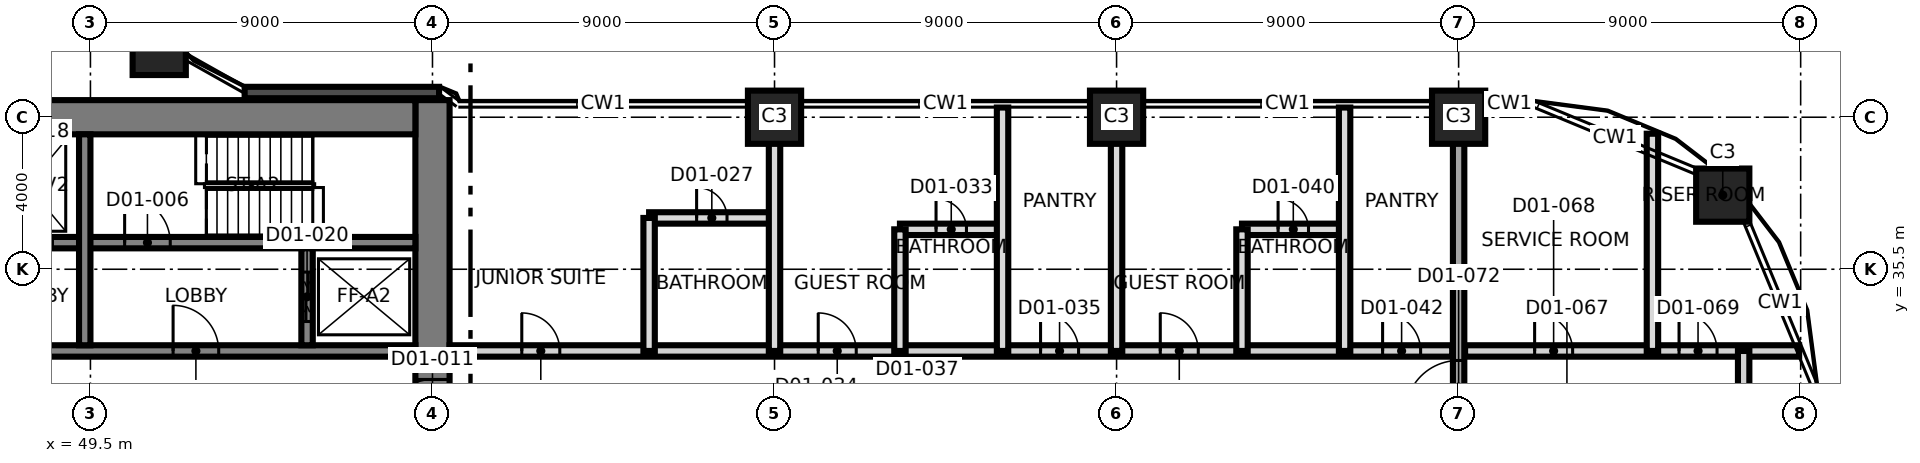
"""IFC4 building model, lengths in metres.
Left out: names, types, materials, properties, quantities, classifications, styles, units other than length and angle.
Written with IfcOpenShell. Run it as: python <this file> out.ifc"""

import sys

from ifc_helpers import new_model, si_unit, direction, frame, frame_2d, origin, origin_2d, place, context, subcontext, project, spatial, rectangle, extrude, element, fill, save


model = new_model("IFC4")
c1 = context("Model", 3, precision=1e-05, world=origin(), true_north=direction((0.0, 1.0)))
c2 = subcontext(c1, "Body", "Model", "MODEL_VIEW")
j1 = project(units=[si_unit("LENGTHUNIT", "METRE"), si_unit("PLANEANGLEUNIT", "RADIAN")], contexts=[c1])
p1 = place(None, origin())
s1 = spatial("IfcSite", under=j1, at=p1, CompositionType="ELEMENT")
p2 = place(p1, origin())
s2 = spatial("IfcBuilding", under=s1, at=p2, CompositionType="ELEMENT")
p3 = place(p2, frame((0.0, 0.0, 33.5)))
s3 = spatial("IfcBuildingStorey", under=s2, at=p3, CompositionType="ELEMENT", Elevation=33.5)
p4 = place(p3, frame((58.5, 21.05, 0.0), z_axis=(0.0, 0.0, 1.0), x_axis=(0.0, 1.0, 0.0)))
e1 = element("IfcWall", 1, at=p4, inside=s3, PredefinedType="SHEAR", context=c2, shape_type="SweptSolid", body=[
    extrude(rectangle(XDim=18.9, YDim=0.9, at=frame_2d((9.45, 0.0))), origin(), (0.0, 0.0, 1.0), 3.7),
])
p5 = place(p4, frame((10.35, 0.0, 0.0)))
e2 = element("IfcOpeningElement", 2, at=p5, cuts=e1, PredefinedType="OPENING", context=c2, shape_type="SweptSolid", body=[
    extrude(rectangle(XDim=1.2, YDim=2.1, at=frame_2d((0.6, 1.05))), frame((0.0, 0.46, 0.0), z_axis=(0.0, -1.0, 0.0), x_axis=(1.0, 0.0, 0.0)), (0.0, 0.0, 1.0), 0.92),
])
p6 = place(p3, frame((31.05, 39.5, 0.0), z_axis=(0.0, 0.0, 1.0), x_axis=(1.0, 0.0, 0.0)))
e3 = element("IfcWall", 3, at=p6, inside=s3, PredefinedType="SHEAR", context=c2, shape_type="SweptSolid", body=[
    extrude(rectangle(XDim=27.0, YDim=0.9, at=frame_2d((13.5, 0.0))), origin(), (0.0, 0.0, 1.0), 3.7),
])
p7 = place(p6, frame((10.65, 0.0, 0.0)))
e4 = element("IfcOpeningElement", 4, at=p7, cuts=e3, PredefinedType="OPENING", context=c2, shape_type="SweptSolid", body=[
    extrude(rectangle(XDim=1.2, YDim=2.1, at=frame_2d((0.6, 1.05))), frame((0.0, 0.46, 0.0), z_axis=(0.0, -1.0, 0.0), x_axis=(1.0, 0.0, 0.0)), (0.0, 0.0, 1.0), 0.92),
])
p8 = place(p3, frame((31.95, 33.35, 0.0), z_axis=(0.0, 0.0, 1.0), x_axis=(1.0, 0.0, 0.0)))
e5 = element("IfcWall", 5, at=p8, inside=s3, PredefinedType="SHEAR", context=c2, shape_type="SweptSolid", body=[
    extrude(rectangle(XDim=26.1, YDim=0.3, at=frame_2d((13.05, 0.0))), origin(), (0.0, 0.0, 1.0), 3.7),
])
p9 = place(p8, frame((13.7, 0.0, 0.0)))
e6 = element("IfcOpeningElement", 6, at=p9, cuts=e5, PredefinedType="OPENING", context=c2, shape_type="SweptSolid", body=[
    extrude(rectangle(XDim=1.4, YDim=2.1, at=frame_2d((0.7, 1.05))), frame((0.0, 0.16, 0.0), z_axis=(0.0, -1.0, 0.0), x_axis=(1.0, 0.0, 0.0)), (0.0, 0.0, 1.0), 0.32),
])
p10 = place(p8, frame((5.175, 0.0, 0.0)))
e7 = element("IfcOpeningElement", 7, at=p10, cuts=e5, PredefinedType="OPENING", context=c2, shape_type="SweptSolid", body=[
    extrude(rectangle(XDim=1.2, YDim=2.1, at=frame_2d((0.6, 1.05))), frame((0.0, 0.16, 0.0), z_axis=(0.0, -1.0, 0.0), x_axis=(1.0, 0.0, 0.0)), (0.0, 0.0, 1.0), 0.32),
])
p11 = place(p8, frame((19.725, 0.0, 0.0)))
e8 = element("IfcOpeningElement", 8, at=p11, cuts=e5, PredefinedType="OPENING", context=c2, shape_type="SweptSolid", body=[
    extrude(rectangle(XDim=1.2, YDim=2.1, at=frame_2d((0.6, 1.05))), frame((0.0, 0.16, 0.0), z_axis=(0.0, -1.0, 0.0), x_axis=(1.0, 0.0, 0.0)), (0.0, 0.0, 1.0), 0.32),
])
p12 = place(p3, frame((43.5, 36.2, 0.0), z_axis=(0.0, 0.0, 1.0), x_axis=(1.0, 0.0, 0.0)))
e9 = element("IfcWall", 9, at=p12, inside=s3, PredefinedType="SHEAR", context=c2, shape_type="SweptSolid", body=[
    extrude(rectangle(XDim=14.55, YDim=0.3, at=frame_2d((7.275, 0.0))), origin(), (0.0, 0.0, 1.0), 3.7),
])
p13 = place(p12, frame((6.9, 0.0, 0.0)))
e10 = element("IfcOpeningElement", 10, at=p13, cuts=e9, PredefinedType="OPENING", context=c2, shape_type="SweptSolid", body=[
    extrude(rectangle(XDim=1.2, YDim=2.1, at=frame_2d((0.6, 1.05))), frame((0.0, 0.16, 0.0), z_axis=(0.0, -1.0, 0.0), x_axis=(1.0, 0.0, 0.0)), (0.0, 0.0, 1.0), 0.32),
])
p14 = place(p12, frame((0.7, 0.0, 0.0)))
e11 = element("IfcOpeningElement", 11, at=p14, cuts=e9, PredefinedType="OPENING", context=c2, shape_type="SweptSolid", body=[
    extrude(rectangle(XDim=1.3, YDim=2.4, at=frame_2d((0.65, 1.2))), frame((0.0, 0.16, 0.0), z_axis=(0.0, -1.0, 0.0), x_axis=(1.0, 0.0, 0.0)), (0.0, 0.0, 1.0), 0.32),
])
p15 = place(p12, frame((3.7, 0.0, 0.0)))
e12 = element("IfcOpeningElement", 12, at=p15, cuts=e9, PredefinedType="OPENING", context=c2, shape_type="SweptSolid", body=[
    extrude(rectangle(XDim=1.3, YDim=2.4, at=frame_2d((0.65, 1.2))), frame((0.0, 0.16, 0.0), z_axis=(0.0, -1.0, 0.0), x_axis=(1.0, 0.0, 0.0)), (0.0, 0.0, 1.0), 0.32),
])
p16 = place(p3, frame((49.35, 33.5, 0.0), z_axis=(0.0, 0.0, 1.0), x_axis=(0.0, 1.0, 0.0)))
e13 = element("IfcWall", 13, at=p16, inside=s3, PredefinedType="SHEAR", context=c2, shape_type="SweptSolid", body=[
    extrude(rectangle(XDim=5.55, YDim=0.3, at=frame_2d((2.775, 0.0))), origin(), (0.0, 0.0, 1.0), 3.7),
])
p17 = place(p3, frame((55.2, 33.5, 0.0), z_axis=(0.0, 0.0, 1.0), x_axis=(0.0, 1.0, 0.0)))
e14 = element("IfcWall", 14, at=p17, inside=s3, PredefinedType="SHEAR", context=c2, shape_type="SweptSolid", body=[
    extrude(rectangle(XDim=2.55, YDim=0.3, at=frame_2d((1.275, 0.0))), origin(), (0.0, 0.0, 1.0), 3.7),
])
p18 = place(p17, frame((0.625, 0.0, 0.0)))
e15 = element("IfcOpeningElement", 15, at=p18, cuts=e14, PredefinedType="OPENING", context=c2, shape_type="SweptSolid", body=[
    extrude(rectangle(XDim=1.3, YDim=2.4, at=frame_2d((0.65, 1.2))), frame((0.0, 0.16, 0.0), z_axis=(0.0, -1.0, 0.0), x_axis=(1.0, 0.0, 0.0)), (0.0, 0.0, 1.0), 0.32),
])
for number, where, z_axis, x_axis in (
    (16, (92.45, 37.45, 0.0), (0.0, 0.0, 1.0), (1.0, 0.0, 0.0)),
    (17, (67.5, 39.5, 0.0), (0.0, 0.0, 1.0), (1.0, 0.0, 0.0)),
    (18, (76.5, 39.5, 0.0), (0.0, 0.0, 1.0), (1.0, 0.0, 0.0)),
    (19, (85.5, 39.5, 0.0), (0.0, 0.0, 1.0), (1.0, 0.0, 0.0)),
    (20, (51.31, 41.31, 0.0), (0.0, 0.0, 1.0), (1.0, 0.0, 0.0)),
):
    element("IfcColumn", number, at=place(p3, frame(where, z_axis=z_axis, x_axis=x_axis)), inside=s3, PredefinedType="COLUMN", context=c2, shape_type="SweptSolid", body=[
        extrude(rectangle(XDim=1.4, YDim=1.4, at=origin_2d()), origin(), (0.0, 0.0, 1.0), 3.7),
    ])
p19 = place(p3, frame((85.5, 21.425, 0.0), z_axis=(0.0, 0.0, 1.0), x_axis=(0.0, 1.0, 0.0)))
e21 = element("IfcWall", 21, at=p19, inside=s3, PredefinedType="SHEAR", context=c2, shape_type="SweptSolid", body=[
    extrude(rectangle(XDim=18.15, YDim=0.3, at=frame_2d((9.075, 0.0))), origin(), (0.0, 0.0, 1.0), 3.7),
])
p20 = place(p19, frame((10.275, 0.0, 0.0)))
e22 = element("IfcOpeningElement", 22, at=p20, cuts=e21, PredefinedType="OPENING", context=c2, shape_type="SweptSolid", body=[
    extrude(rectangle(XDim=1.4, YDim=2.1, at=frame_2d((0.7, 1.05))), frame((0.0, 0.16, 0.0), z_axis=(0.0, -1.0, 0.0), x_axis=(1.0, 0.0, 0.0)), (0.0, 0.0, 1.0), 0.32),
])
p21 = place(p3, frame((58.674, 40.15, 0.0), z_axis=(0.0, 0.0, 1.0), x_axis=(-1.0, 0.0, 0.0)))
e23 = element("IfcWall", 23, at=p21, inside=s3, PredefinedType="SOLIDWALL", context=c2, shape_type="SweptSolid", body=[
    extrude(rectangle(XDim=5.116, YDim=0.3, at=frame_2d((2.558, 0.0))), origin(), (0.0, 0.0, 1.0), 3.4),
])
p22 = place(p3, frame((58.95, 33.35, 0.0), z_axis=(0.0, 0.0, 1.0), x_axis=(1.0, 0.0, 0.0)))
e24 = element("IfcWall", 24, at=p22, inside=s3, PredefinedType="PARTITIONING", context=c2, shape_type="SweptSolid", body=[
    extrude(rectangle(XDim=26.38, YDim=0.3, at=frame_2d((13.19, 0.0))), origin(), (0.0, 0.0, 1.0), 3.4),
])
p23 = place(p22, frame((1.9, 0.0, 0.0)))
e25 = element("IfcOpeningElement", 25, at=p23, cuts=e24, PredefinedType="OPENING", context=c2, shape_type="SweptSolid", body=[
    extrude(rectangle(XDim=1.0, YDim=2.4, at=frame_2d((0.5, 1.2))), frame((0.0, 0.16, 0.0), z_axis=(0.0, -1.0, 0.0), x_axis=(1.0, 0.0, 0.0)), (0.0, 0.0, 1.0), 0.32),
])
p24 = place(p22, frame((9.7, 0.0, 0.0)))
e26 = element("IfcOpeningElement", 26, at=p24, cuts=e24, PredefinedType="OPENING", context=c2, shape_type="SweptSolid", body=[
    extrude(rectangle(XDim=1.0, YDim=2.1, at=frame_2d((0.5, 1.05))), frame((0.0, 0.16, 0.0), z_axis=(0.0, -1.0, 0.0), x_axis=(1.0, 0.0, 0.0)), (0.0, 0.0, 1.0), 0.32),
])
p25 = place(p22, frame((15.55, 0.0, 0.0)))
e27 = element("IfcOpeningElement", 27, at=p25, cuts=e24, PredefinedType="OPENING", context=c2, shape_type="SweptSolid", body=[
    extrude(rectangle(XDim=1.0, YDim=2.1, at=frame_2d((0.5, 1.05))), frame((0.0, 0.16, 0.0), z_axis=(0.0, -1.0, 0.0), x_axis=(1.0, 0.0, 0.0)), (0.0, 0.0, 1.0), 0.32),
])
p26 = place(p22, frame((18.7, 0.0, 0.0)))
e28 = element("IfcOpeningElement", 28, at=p26, cuts=e24, PredefinedType="OPENING", context=c2, shape_type="SweptSolid", body=[
    extrude(rectangle(XDim=1.0, YDim=2.1, at=frame_2d((0.5, 1.05))), frame((0.0, 0.16, 0.0), z_axis=(0.0, -1.0, 0.0), x_axis=(1.0, 0.0, 0.0)), (0.0, 0.0, 1.0), 0.32),
])
p27 = place(p22, frame((24.55, 0.0, 0.0)))
e29 = element("IfcOpeningElement", 29, at=p27, cuts=e24, PredefinedType="OPENING", context=c2, shape_type="SweptSolid", body=[
    extrude(rectangle(XDim=1.0, YDim=2.1, at=frame_2d((0.5, 1.05))), frame((0.0, 0.16, 0.0), z_axis=(0.0, -1.0, 0.0), x_axis=(1.0, 0.0, 0.0)), (0.0, 0.0, 1.0), 0.32),
])
p28 = place(p3, frame((85.67, 33.35, 0.0), z_axis=(0.0, 0.0, 1.0), x_axis=(1.0, 0.0, 0.0)))
e30 = element("IfcWall", 30, at=p28, inside=s3, PredefinedType="PARTITIONING", context=c2, shape_type="SweptSolid", body=[
    extrude(rectangle(XDim=8.79, YDim=0.3, at=frame_2d((4.395, 0.0))), origin(), (0.0, 0.0, 1.0), 3.4),
])
p29 = place(p28, frame((1.83, 0.0, 0.0)))
e31 = element("IfcOpeningElement", 31, at=p29, cuts=e30, PredefinedType="OPENING", context=c2, shape_type="SweptSolid", body=[
    extrude(rectangle(XDim=1.0, YDim=2.1, at=frame_2d((0.5, 1.05))), frame((0.0, 0.16, 0.0), z_axis=(0.0, -1.0, 0.0), x_axis=(1.0, 0.0, 0.0)), (0.0, 0.0, 1.0), 0.32),
])
p30 = place(p28, frame((5.63, 0.0, 0.0)))
e32 = element("IfcOpeningElement", 32, at=p30, cuts=e30, PredefinedType="OPENING", context=c2, shape_type="SweptSolid", body=[
    extrude(rectangle(XDim=1.0, YDim=2.1, at=frame_2d((0.5, 1.05))), frame((0.0, 0.16, 0.0), z_axis=(0.0, -1.0, 0.0), x_axis=(1.0, 0.0, 0.0)), (0.0, 0.0, 1.0), 0.32),
])
p31 = place(p3, frame((70.8, 36.55, 0.0), z_axis=(0.0, 0.0, 1.0), x_axis=(1.0, 0.0, 0.0)))
e33 = element("IfcWall", 33, at=p31, inside=s3, PredefinedType="PARTITIONING", context=c2, shape_type="SweptSolid", body=[
    extrude(rectangle(XDim=2.7, YDim=0.3, at=frame_2d((1.35, 0.0))), origin(), (0.0, 0.0, 1.0), 3.4),
])
p32 = place(p31, frame((0.95, 0.0, 0.0)))
e34 = element("IfcOpeningElement", 34, at=p32, cuts=e33, PredefinedType="OPENING", context=c2, shape_type="SweptSolid", body=[
    extrude(rectangle(XDim=0.8, YDim=2.1, at=frame_2d((0.4, 1.05))), frame((0.0, 0.16, 0.0), z_axis=(0.0, -1.0, 0.0), x_axis=(1.0, 0.0, 0.0)), (0.0, 0.0, 1.0), 0.32),
])
p33 = place(p3, frame((79.8, 36.55, 0.0), z_axis=(0.0, 0.0, 1.0), x_axis=(1.0, 0.0, 0.0)))
e35 = element("IfcWall", 35, at=p33, inside=s3, PredefinedType="PARTITIONING", context=c2, shape_type="SweptSolid", body=[
    extrude(rectangle(XDim=2.7, YDim=0.3, at=frame_2d((1.35, 0.0))), origin(), (0.0, 0.0, 1.0), 3.4),
])
p34 = place(p33, frame((0.95, 0.0, 0.0)))
e36 = element("IfcOpeningElement", 36, at=p34, cuts=e35, PredefinedType="OPENING", context=c2, shape_type="SweptSolid", body=[
    extrude(rectangle(XDim=0.8, YDim=2.1, at=frame_2d((0.4, 1.05))), frame((0.0, 0.16, 0.0), z_axis=(0.0, -1.0, 0.0), x_axis=(1.0, 0.0, 0.0)), (0.0, 0.0, 1.0), 0.32),
])
p35 = place(p3, frame((64.2, 36.85, 0.0), z_axis=(0.0, 0.0, 1.0), x_axis=(1.0, 0.0, 0.0)))
e37 = element("IfcWall", 37, at=p35, inside=s3, PredefinedType="PARTITIONING", context=c2, shape_type="SweptSolid", body=[
    extrude(rectangle(XDim=3.3, YDim=0.3, at=frame_2d((1.65, 0.0))), origin(), (0.0, 0.0, 1.0), 3.4),
])
p36 = place(p35, frame((1.25, 0.0, 0.0)))
e38 = element("IfcOpeningElement", 38, at=p36, cuts=e37, PredefinedType="OPENING", context=c2, shape_type="SweptSolid", body=[
    extrude(rectangle(XDim=0.8, YDim=2.1, at=frame_2d((0.4, 1.05))), frame((0.0, 0.16, 0.0), z_axis=(0.0, -1.0, 0.0), x_axis=(1.0, 0.0, 0.0)), (0.0, 0.0, 1.0), 0.32),
])
p37 = place(p3, frame((64.2, 33.35, 0.0), z_axis=(0.0, 0.0, 1.0), x_axis=(0.0, 1.0, 0.0)))
e39 = element("IfcWall", 39, at=p37, inside=s3, PredefinedType="PARTITIONING", context=c2, shape_type="SweptSolid", body=[
    extrude(rectangle(XDim=3.5, YDim=0.3, at=frame_2d((1.75, 0.0))), origin(), (0.0, 0.0, 1.0), 3.4),
])
p38 = place(p3, frame((67.5, 33.35, 0.0), z_axis=(0.0, 0.0, 1.0), x_axis=(0.0, 1.0, 0.0)))
e40 = element("IfcWall", 40, at=p38, inside=s3, PredefinedType="PARTITIONING", context=c2, shape_type="SweptSolid", body=[
    extrude(rectangle(XDim=6.225, YDim=0.3, at=frame_2d((3.112, 0.0))), origin(), (0.0, 0.0, 1.0), 3.4),
])
p39 = place(p3, frame((70.8, 33.35, 0.0), z_axis=(0.0, 0.0, 1.0), x_axis=(0.0, 1.0, 0.0)))
e41 = element("IfcWall", 41, at=p39, inside=s3, PredefinedType="PARTITIONING", context=c2, shape_type="SweptSolid", body=[
    extrude(rectangle(XDim=3.2, YDim=0.3, at=frame_2d((1.6, 0.0))), origin(), (0.0, 0.0, 1.0), 3.4),
])
p40 = place(p3, frame((73.5, 33.35, 0.0), z_axis=(0.0, 0.0, 1.0), x_axis=(0.0, 1.0, 0.0)))
e42 = element("IfcWall", 42, at=p40, inside=s3, PredefinedType="PARTITIONING", context=c2, shape_type="SweptSolid", body=[
    extrude(rectangle(XDim=6.405, YDim=0.3, at=frame_2d((3.202, 0.0))), origin(), (0.0, 0.0, 1.0), 3.4),
])
p41 = place(p3, frame((76.5, 33.35, 0.0), z_axis=(0.0, 0.0, 1.0), x_axis=(0.0, 1.0, 0.0)))
e43 = element("IfcWall", 43, at=p41, inside=s3, PredefinedType="PARTITIONING", context=c2, shape_type="SweptSolid", body=[
    extrude(rectangle(XDim=6.225, YDim=0.3, at=frame_2d((3.112, 0.0))), origin(), (0.0, 0.0, 1.0), 3.4),
])
p42 = place(p3, frame((79.8, 33.35, 0.0), z_axis=(0.0, 0.0, 1.0), x_axis=(0.0, 1.0, 0.0)))
e44 = element("IfcWall", 44, at=p42, inside=s3, PredefinedType="PARTITIONING", context=c2, shape_type="SweptSolid", body=[
    extrude(rectangle(XDim=3.2, YDim=0.3, at=frame_2d((1.6, 0.0))), origin(), (0.0, 0.0, 1.0), 3.4),
])
p43 = place(p3, frame((82.5, 33.35, 0.0), z_axis=(0.0, 0.0, 1.0), x_axis=(0.0, 1.0, 0.0)))
e45 = element("IfcWall", 45, at=p43, inside=s3, PredefinedType="PARTITIONING", context=c2, shape_type="SweptSolid", body=[
    extrude(rectangle(XDim=6.405, YDim=0.3, at=frame_2d((3.202, 0.0))), origin(), (0.0, 0.0, 1.0), 3.4),
])
p44 = place(p3, frame((90.6, 33.35, 0.0), z_axis=(0.0, 0.0, 1.0), x_axis=(0.0, 1.0, 0.0)))
e46 = element("IfcWall", 46, at=p44, inside=s3, PredefinedType="PARTITIONING", context=c2, shape_type="SweptSolid", body=[
    extrude(rectangle(XDim=5.716, YDim=0.3, at=frame_2d((2.858, 0.0))), origin(), (0.0, 0.0, 1.0), 3.4),
])
p45 = place(p3, frame((93.0, 30.65, 0.0), z_axis=(0.0, 0.0, 1.0), x_axis=(0.0, 1.0, 0.0)))
e47 = element("IfcWall", 47, at=p45, inside=s3, PredefinedType="PARTITIONING", context=c2, shape_type="SweptSolid", body=[
    extrude(rectangle(XDim=2.7, YDim=0.3, at=frame_2d((1.35, 0.0))), origin(), (0.0, 0.0, 1.0), 3.4),
])
p46 = place(p11, origin())
e48 = element("IfcDoor", 48, at=p46, inside=s3, OperationType="SINGLE_SWING_RIGHT", PredefinedType="DOOR", context=c2, shape_type="SweptSolid", body=[
    extrude(rectangle(XDim=1.2, YDim=2.1, at=frame_2d((0.6, 1.05))), frame((0.0, 0.025, 0.0), z_axis=(0.0, -1.0, 0.0), x_axis=(1.0, 0.0, 0.0)), (0.0, 0.0, 1.0), 0.05),
])
fill(e8, e48)
p47 = place(p13, origin())
e49 = element("IfcDoor", 49, at=p47, inside=s3, OperationType="SINGLE_SWING_LEFT", PredefinedType="DOOR", context=c2, shape_type="SweptSolid", body=[
    extrude(rectangle(XDim=1.2, YDim=2.1, at=frame_2d((0.6, 1.05))), frame((0.0, 0.025, 0.0), z_axis=(0.0, -1.0, 0.0), x_axis=(1.0, 0.0, 0.0)), (0.0, 0.0, 1.0), 0.05),
])
fill(e10, e49)
p48 = place(p5, origin())
e50 = element("IfcDoor", 50, at=p48, inside=s3, OperationType="SINGLE_SWING_LEFT", PredefinedType="DOOR", context=c2, shape_type="SweptSolid", body=[
    extrude(rectangle(XDim=1.2, YDim=2.1, at=frame_2d((0.6, 1.05))), frame((0.0, 0.025, 0.0), z_axis=(0.0, -1.0, 0.0), x_axis=(1.0, 0.0, 0.0)), (0.0, 0.0, 1.0), 0.05),
])
fill(e2, e50)
p49 = place(p18, origin())
e51 = element("IfcDoor", 51, at=p49, inside=s3, OperationType="SLIDING_TO_LEFT", PredefinedType="DOOR", context=c2, shape_type="SweptSolid", body=[
    extrude(rectangle(XDim=1.3, YDim=2.4, at=frame_2d((0.65, 1.2))), frame((0.0, 0.025, 0.0), z_axis=(0.0, -1.0, 0.0), x_axis=(1.0, 0.0, 0.0)), (0.0, 0.0, 1.0), 0.05),
])
fill(e15, e51)
p50 = place(p36, origin())
e52 = element("IfcDoor", 52, at=p50, inside=s3, OperationType="SINGLE_SWING_LEFT", PredefinedType="DOOR", context=c2, shape_type="SweptSolid", body=[
    extrude(rectangle(XDim=0.8, YDim=2.1, at=frame_2d((0.4, 1.05))), frame((0.0, 0.025, 0.0), z_axis=(0.0, -1.0, 0.0), x_axis=(1.0, 0.0, 0.0)), (0.0, 0.0, 1.0), 0.05),
])
fill(e38, e52)
p51 = place(p23, origin())
e53 = element("IfcDoor", 53, at=p51, inside=s3, OperationType="SINGLE_SWING_LEFT", PredefinedType="DOOR", context=c2, shape_type="SweptSolid", body=[
    extrude(rectangle(XDim=1.0, YDim=2.4, at=frame_2d((0.5, 1.2))), frame((0.0, 0.025, 0.0), z_axis=(0.0, -1.0, 0.0), x_axis=(1.0, 0.0, 0.0)), (0.0, 0.0, 1.0), 0.05),
])
fill(e25, e53)
p52 = place(p32, origin())
e54 = element("IfcDoor", 54, at=p52, inside=s3, OperationType="SINGLE_SWING_LEFT", PredefinedType="DOOR", context=c2, shape_type="SweptSolid", body=[
    extrude(rectangle(XDim=0.8, YDim=2.1, at=frame_2d((0.4, 1.05))), frame((0.0, 0.025, 0.0), z_axis=(0.0, -1.0, 0.0), x_axis=(1.0, 0.0, 0.0)), (0.0, 0.0, 1.0), 0.05),
])
fill(e34, e54)
p53 = place(p24, origin())
e55 = element("IfcDoor", 55, at=p53, inside=s3, OperationType="SINGLE_SWING_LEFT", PredefinedType="DOOR", context=c2, shape_type="SweptSolid", body=[
    extrude(rectangle(XDim=1.0, YDim=2.1, at=frame_2d((0.5, 1.05))), frame((0.0, 0.025, 0.0), z_axis=(0.0, -1.0, 0.0), x_axis=(1.0, 0.0, 0.0)), (0.0, 0.0, 1.0), 0.05),
])
fill(e26, e55)
p54 = place(p25, origin())
e56 = element("IfcDoor", 56, at=p54, inside=s3, OperationType="SINGLE_SWING_RIGHT", PredefinedType="DOOR", context=c2, shape_type="SweptSolid", body=[
    extrude(rectangle(XDim=1.0, YDim=2.1, at=frame_2d((0.5, 1.05))), frame((0.0, 0.025, 0.0), z_axis=(0.0, -1.0, 0.0), x_axis=(1.0, 0.0, 0.0)), (0.0, 0.0, 1.0), 0.05),
])
fill(e27, e56)
p55 = place(p34, origin())
e57 = element("IfcDoor", 57, at=p55, inside=s3, OperationType="SINGLE_SWING_RIGHT", PredefinedType="DOOR", context=c2, shape_type="SweptSolid", body=[
    extrude(rectangle(XDim=0.8, YDim=2.1, at=frame_2d((0.4, 1.05))), frame((0.0, 0.025, 0.0), z_axis=(0.0, -1.0, 0.0), x_axis=(1.0, 0.0, 0.0)), (0.0, 0.0, 1.0), 0.05),
])
fill(e36, e57)
p56 = place(p26, origin())
e58 = element("IfcDoor", 58, at=p56, inside=s3, OperationType="SINGLE_SWING_LEFT", PredefinedType="DOOR", context=c2, shape_type="SweptSolid", body=[
    extrude(rectangle(XDim=1.0, YDim=2.1, at=frame_2d((0.5, 1.05))), frame((0.0, 0.025, 0.0), z_axis=(0.0, -1.0, 0.0), x_axis=(1.0, 0.0, 0.0)), (0.0, 0.0, 1.0), 0.05),
])
fill(e28, e58)
p57 = place(p27, origin())
e59 = element("IfcDoor", 59, at=p57, inside=s3, OperationType="SINGLE_SWING_LEFT", PredefinedType="DOOR", context=c2, shape_type="SweptSolid", body=[
    extrude(rectangle(XDim=1.0, YDim=2.1, at=frame_2d((0.5, 1.05))), frame((0.0, 0.025, 0.0), z_axis=(0.0, -1.0, 0.0), x_axis=(1.0, 0.0, 0.0)), (0.0, 0.0, 1.0), 0.05),
])
fill(e29, e59)
p58 = place(p29, origin())
e60 = element("IfcDoor", 60, at=p58, inside=s3, OperationType="SINGLE_SWING_LEFT", PredefinedType="DOOR", context=c2, shape_type="SweptSolid", body=[
    extrude(rectangle(XDim=1.0, YDim=2.1, at=frame_2d((0.5, 1.05))), frame((0.0, 0.025, 0.0), z_axis=(0.0, -1.0, 0.0), x_axis=(1.0, 0.0, 0.0)), (0.0, 0.0, 1.0), 0.05),
])
fill(e31, e60)
p59 = place(p30, origin())
e61 = element("IfcDoor", 61, at=p59, inside=s3, OperationType="SINGLE_SWING_RIGHT", PredefinedType="DOOR", context=c2, shape_type="SweptSolid", body=[
    extrude(rectangle(XDim=1.0, YDim=2.1, at=frame_2d((0.5, 1.05))), frame((0.0, 0.025, 0.0), z_axis=(0.0, -1.0, 0.0), x_axis=(1.0, 0.0, 0.0)), (0.0, 0.0, 1.0), 0.05),
])
fill(e32, e61)
p60 = place(p20, origin())
e62 = element("IfcDoor", 62, at=p60, inside=s3, OperationType="SINGLE_SWING_RIGHT", PredefinedType="DOOR", context=c2, shape_type="SweptSolid", body=[
    extrude(rectangle(XDim=1.4, YDim=2.1, at=frame_2d((0.7, 1.05))), frame((0.0, 0.025, 0.0), z_axis=(0.0, -1.0, 0.0), x_axis=(1.0, 0.0, 0.0)), (0.0, 0.0, 1.0), 0.05),
])
fill(e22, e62)
save(model, sys.argv[1])
